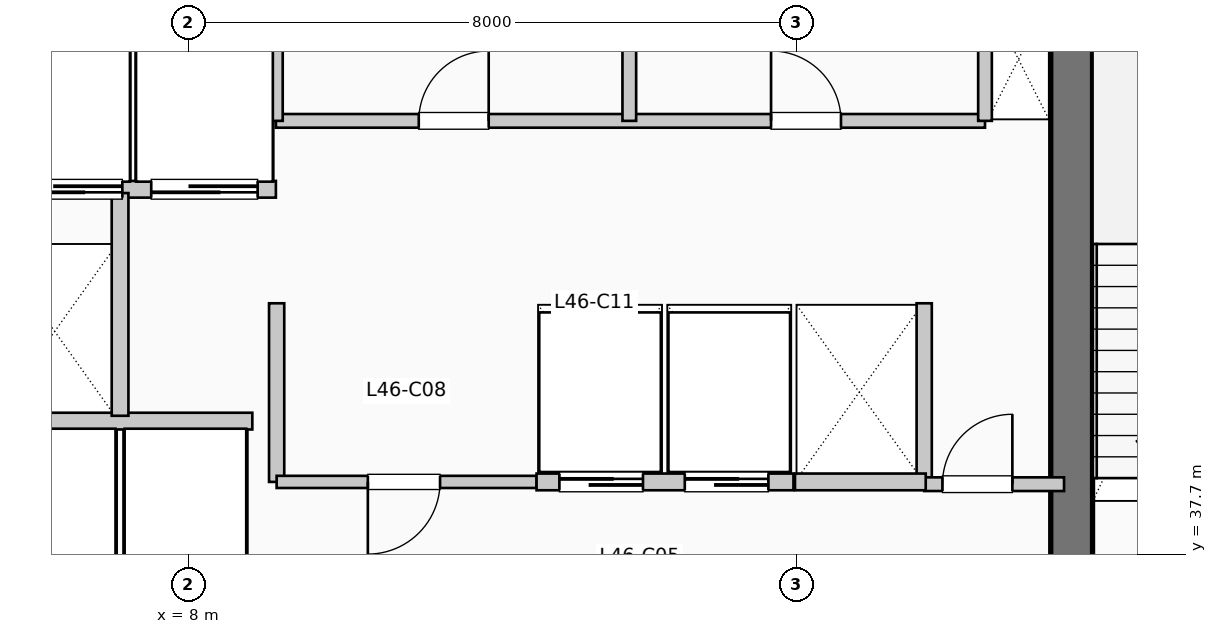
"""IFC4 building model, lengths in metres.
Left out: names, types, materials, properties, quantities, classifications, styles, units other than length and angle.
Written with IfcOpenShell. Run it as: python <this file> out.ifc"""

import sys

from ifc_helpers import new_model, si_unit, direction, frame, frame_2d, origin, place, context, subcontext, project, spatial, rectangle, extrude, element, fill, save


model = new_model("IFC4")
c1 = context("Model", 3, precision=1e-05, world=origin(), true_north=direction((0.0, 1.0)))
c2 = subcontext(c1, "Body", "Model", "MODEL_VIEW")
j1 = project(units=[si_unit("LENGTHUNIT", "METRE"), si_unit("PLANEANGLEUNIT", "RADIAN")], contexts=[c1])
p1 = place(None, origin())
s1 = spatial("IfcSite", under=j1, at=p1, CompositionType="ELEMENT")
p2 = place(p1, origin())
s2 = spatial("IfcBuilding", under=s1, at=p2, CompositionType="ELEMENT")
p3 = place(p2, frame((0.0, 0.0, 191.4)))
s3 = spatial("IfcBuildingStorey", under=s2, at=p3, CompositionType="ELEMENT", Elevation=191.4)
p4 = place(p3, frame((19.62, 37.15, 0.0), z_axis=(0.0, 0.0, 1.0), x_axis=(0.0, 1.0, 0.0)))
e1 = element("IfcWall", 1, at=p4, inside=s3, PredefinedType="SHEAR", context=c2, shape_type="SweptSolid", body=[
    extrude(rectangle(XDim=7.89, YDim=0.55, at=frame_2d((3.945, 0.0))), origin(), (0.0, 0.0, 1.0), 3.96),
])
p5 = place(p3, frame((5.38, 39.45, 0.0), z_axis=(0.0, 0.0, 1.0), x_axis=(1.0, 0.0, 0.0)))
e2 = element("IfcWall", 2, at=p5, inside=s3, PredefinedType="PARTITIONING", context=c2, shape_type="SweptSolid", body=[
    extrude(rectangle(XDim=3.46, YDim=0.22, at=frame_2d((1.73, 0.0))), origin(), (0.0, 0.0, 1.0), 3.71),
])
p6 = place(p3, frame((5.38, 42.5, 0.0), z_axis=(0.0, 0.0, 1.0), x_axis=(1.0, 0.0, 0.0)))
e3 = element("IfcWall", 3, at=p6, inside=s3, PredefinedType="PARTITIONING", context=c2, shape_type="SweptSolid", body=[
    extrude(rectangle(XDim=3.77, YDim=0.22, at=frame_2d((1.885, 0.0))), origin(), (0.0, 0.0, 1.0), 3.71),
])
p7 = place(p6, frame((1.75, 0.0, 0.0), z_axis=(0.0, 0.0, 1.0), x_axis=(-1.0, 0.0, 0.0)))
e4 = element("IfcOpeningElement", 4, at=p7, cuts=e3, PredefinedType="OPENING", context=c2, shape_type="SweptSolid", body=[
    extrude(rectangle(XDim=1.4, YDim=2.2, at=frame_2d((0.7, 1.1))), frame((0.0, 0.12, 0.0), z_axis=(0.0, -1.0, 0.0), x_axis=(1.0, 0.0, 0.0)), (0.0, 0.0, 1.0), 0.24),
])
p8 = place(p6, frame((3.53, 0.0, 0.0), z_axis=(0.0, 0.0, 1.0), x_axis=(-1.0, 0.0, 0.0)))
e5 = element("IfcOpeningElement", 5, at=p8, cuts=e3, PredefinedType="OPENING", context=c2, shape_type="SweptSolid", body=[
    extrude(rectangle(XDim=1.4, YDim=2.2, at=frame_2d((0.7, 1.1))), frame((0.0, 0.12, 0.0), z_axis=(0.0, -1.0, 0.0), x_axis=(1.0, 0.0, 0.0)), (0.0, 0.0, 1.0), 0.24),
])
p9 = place(p3, frame((7.1, 39.52, 0.0), z_axis=(0.0, 0.0, 1.0), x_axis=(0.0, 1.0, 0.0)))
e6 = element("IfcWall", 6, at=p9, inside=s3, PredefinedType="PARTITIONING", context=c2, shape_type="SweptSolid", body=[
    extrude(rectangle(XDim=2.93, YDim=0.22, at=frame_2d((1.465, 0.0))), origin(), (0.0, 0.0, 1.0), 3.71),
])
for number, where, z_axis, x_axis in (
    (7, (9.16, 38.65, 0.0), (0.0, 0.0, 1.0), (0.0, 1.0, 0.0)),
    (8, (17.68, 38.65, 0.0), (0.0, 0.0, 1.0), (0.0, 1.0, 0.0)),
):
    element("IfcWall", number, at=place(p3, frame(where, z_axis=z_axis, x_axis=x_axis)), inside=s3, PredefinedType="PARTITIONING", context=c2, shape_type="SweptSolid", body=[
        extrude(rectangle(XDim=2.35, YDim=0.2, at=frame_2d((1.175, 0.0))), origin(), (0.0, 0.0, 1.0), 3.71),
    ])
p10 = place(p3, frame((17.68, 38.62, 0.0), z_axis=(0.0, 0.0, 1.0), x_axis=(1.0, 0.0, 0.0)))
e9 = element("IfcWall", 9, at=p10, inside=s3, PredefinedType="PARTITIONING", context=c2, shape_type="SweptSolid", body=[
    extrude(rectangle(XDim=1.84, YDim=0.18, at=frame_2d((0.92, 0.0))), origin(), (0.0, 0.0, 1.0), 3.71),
])
p11 = place(p10, frame((0.24, 0.0, 0.0)))
e10 = element("IfcOpeningElement", 10, at=p11, cuts=e9, PredefinedType="OPENING", context=c2, shape_type="SweptSolid", body=[
    extrude(rectangle(XDim=0.92, YDim=2.1, at=frame_2d((0.46, 1.05))), frame((0.0, 0.1, 0.0), z_axis=(0.0, -1.0, 0.0), x_axis=(1.0, 0.0, 0.0)), (0.0, 0.0, 1.0), 0.2),
])
p12 = place(p3, frame((9.16, 38.65, 0.0), z_axis=(0.0, 0.0, 1.0), x_axis=(1.0, 0.0, 0.0)))
e11 = element("IfcWall", 11, at=p12, inside=s3, PredefinedType="PARTITIONING", context=c2, shape_type="SweptSolid", body=[
    extrude(rectangle(XDim=3.42, YDim=0.16, at=frame_2d((1.71, 0.0))), origin(), (0.0, 0.0, 1.0), 3.71),
])
p13 = place(p12, frame((2.15, 0.0, 0.0), z_axis=(0.0, 0.0, 1.0), x_axis=(-1.0, 0.0, 0.0)))
e12 = element("IfcOpeningElement", 12, at=p13, cuts=e11, PredefinedType="OPENING", context=c2, shape_type="SweptSolid", body=[
    extrude(rectangle(XDim=0.95, YDim=2.15, at=frame_2d((0.475, 1.075))), frame((0.0, 0.09, 0.0), z_axis=(0.0, -1.0, 0.0), x_axis=(1.0, 0.0, 0.0)), (0.0, 0.0, 1.0), 0.18),
])
p14 = place(p3, frame((12.58, 38.65, 0.0), z_axis=(0.0, 0.0, 1.0), x_axis=(1.0, 0.0, 0.0)))
e13 = element("IfcWall", 13, at=p14, inside=s3, PredefinedType="PARTITIONING", context=c2, shape_type="SweptSolid", body=[
    extrude(rectangle(XDim=3.38, YDim=0.22, at=frame_2d((1.69, 0.0))), origin(), (0.0, 0.0, 1.0), 3.71),
])
p15 = place(p14, frame((0.3, 0.0, 0.0)))
e14 = element("IfcOpeningElement", 14, at=p15, cuts=e13, PredefinedType="OPENING", context=c2, shape_type="SweptSolid", body=[
    extrude(rectangle(XDim=1.1, YDim=2.2, at=frame_2d((0.55, 1.1))), frame((0.0, 0.12, 0.0), z_axis=(0.0, -1.0, 0.0), x_axis=(1.0, 0.0, 0.0)), (0.0, 0.0, 1.0), 0.24),
])
p16 = place(p14, frame((1.95, 0.0, 0.0)))
e15 = element("IfcOpeningElement", 15, at=p16, cuts=e13, PredefinedType="OPENING", context=c2, shape_type="SweptSolid", body=[
    extrude(rectangle(XDim=1.1, YDim=2.2, at=frame_2d((0.55, 1.1))), frame((0.0, 0.12, 0.0), z_axis=(0.0, -1.0, 0.0), x_axis=(1.0, 0.0, 0.0)), (0.0, 0.0, 1.0), 0.24),
])
p17 = place(p3, frame((15.98, 38.65, 0.0), z_axis=(0.0, 0.0, 1.0), x_axis=(1.0, 0.0, 0.0)))
e16 = element("IfcWall", 16, at=p17, inside=s3, PredefinedType="PARTITIONING", context=c2, shape_type="SweptSolid", body=[
    extrude(rectangle(XDim=1.72, YDim=0.22, at=frame_2d((0.86, 0.0))), origin(), (0.0, 0.0, 1.0), 3.71),
])
p18 = place(p3, frame((9.15, 43.4, 0.0), z_axis=(0.0, 0.0, 1.0), x_axis=(1.0, 0.0, 0.0)))
e17 = element("IfcWall", 17, at=p18, inside=s3, PredefinedType="PLUMBINGWALL", context=c2, shape_type="SweptSolid", body=[
    extrude(rectangle(XDim=9.33, YDim=0.18, at=frame_2d((4.665, 0.0))), origin(), (0.0, 0.0, 1.0), 3.71),
])
p19 = place(p18, frame((1.88, 0.0, 0.0)))
e18 = element("IfcOpeningElement", 18, at=p19, cuts=e17, PredefinedType="OPENING", context=c2, shape_type="SweptSolid", body=[
    extrude(rectangle(XDim=0.92, YDim=2.1, at=frame_2d((0.46, 1.05))), frame((0.0, 0.1, 0.0), z_axis=(0.0, -1.0, 0.0), x_axis=(1.0, 0.0, 0.0)), (0.0, 0.0, 1.0), 0.2),
])
p20 = place(p18, frame((6.515, 0.0, 0.0)))
e19 = element("IfcOpeningElement", 19, at=p20, cuts=e17, PredefinedType="OPENING", context=c2, shape_type="SweptSolid", body=[
    extrude(rectangle(XDim=0.92, YDim=2.1, at=frame_2d((0.46, 1.05))), frame((0.0, 0.1, 0.0), z_axis=(0.0, -1.0, 0.0), x_axis=(1.0, 0.0, 0.0)), (0.0, 0.0, 1.0), 0.2),
])
for number, where, z_axis, x_axis in (
    (20, (9.15, 43.4, 0.0), (0.0, 0.0, 1.0), (0.0, 1.0, 0.0)),
    (21, (18.48, 43.4, 0.0), (0.0, 0.0, 1.0), (0.0, 1.0, 0.0)),
    (22, (13.8, 43.4, 0.0), (0.0, 0.0, 1.0), (0.0, 1.0, 0.0)),
):
    element("IfcWall", number, at=place(p3, frame(where, z_axis=z_axis, x_axis=x_axis)), inside=s3, PredefinedType="PLUMBINGWALL", context=c2, shape_type="SweptSolid", body=[
        extrude(rectangle(XDim=1.88, YDim=0.18, at=frame_2d((0.94, 0.0))), origin(), (0.0, 0.0, 1.0), 3.71),
    ])
p21 = place(p7, origin())
e23 = element("IfcDoor", 23, at=p21, inside=s3, OperationType="SLIDING_TO_LEFT", PredefinedType="DOOR", context=c2, shape_type="SweptSolid", body=[
    extrude(rectangle(XDim=1.4, YDim=2.2, at=frame_2d((0.7, 1.1))), frame((0.0, 0.025, 0.0), z_axis=(0.0, -1.0, 0.0), x_axis=(1.0, 0.0, 0.0)), (0.0, 0.0, 1.0), 0.05),
])
fill(e4, e23)
p22 = place(p8, origin())
e24 = element("IfcDoor", 24, at=p22, inside=s3, OperationType="SLIDING_TO_LEFT", PredefinedType="DOOR", context=c2, shape_type="SweptSolid", body=[
    extrude(rectangle(XDim=1.4, YDim=2.2, at=frame_2d((0.7, 1.1))), frame((0.0, 0.025, 0.0), z_axis=(0.0, -1.0, 0.0), x_axis=(1.0, 0.0, 0.0)), (0.0, 0.0, 1.0), 0.05),
])
fill(e5, e24)
p23 = place(p11, origin())
e25 = element("IfcDoor", 25, at=p23, inside=s3, OperationType="SINGLE_SWING_RIGHT", PredefinedType="DOOR", context=c2, shape_type="SweptSolid", body=[
    extrude(rectangle(XDim=0.92, YDim=2.1, at=frame_2d((0.46, 1.05))), frame((0.0, 0.025, 0.0), z_axis=(0.0, -1.0, 0.0), x_axis=(1.0, 0.0, 0.0)), (0.0, 0.0, 1.0), 0.05),
])
fill(e10, e25)
p24 = place(p13, origin())
e26 = element("IfcDoor", 26, at=p24, inside=s3, OperationType="SINGLE_SWING_LEFT", PredefinedType="DOOR", context=c2, shape_type="SweptSolid", body=[
    extrude(rectangle(XDim=0.95, YDim=2.15, at=frame_2d((0.475, 1.075))), frame((0.0, 0.025, 0.0), z_axis=(0.0, -1.0, 0.0), x_axis=(1.0, 0.0, 0.0)), (0.0, 0.0, 1.0), 0.05),
])
fill(e12, e26)
p25 = place(p15, origin())
e27 = element("IfcDoor", 27, at=p25, inside=s3, OperationType="SLIDING_TO_RIGHT", PredefinedType="DOOR", context=c2, shape_type="SweptSolid", body=[
    extrude(rectangle(XDim=1.1, YDim=2.2, at=frame_2d((0.55, 1.1))), frame((0.0, 0.025, 0.0), z_axis=(0.0, -1.0, 0.0), x_axis=(1.0, 0.0, 0.0)), (0.0, 0.0, 1.0), 0.05),
])
fill(e14, e27)
p26 = place(p16, origin())
e28 = element("IfcDoor", 28, at=p26, inside=s3, OperationType="SLIDING_TO_RIGHT", PredefinedType="DOOR", context=c2, shape_type="SweptSolid", body=[
    extrude(rectangle(XDim=1.1, YDim=2.2, at=frame_2d((0.55, 1.1))), frame((0.0, 0.025, 0.0), z_axis=(0.0, -1.0, 0.0), x_axis=(1.0, 0.0, 0.0)), (0.0, 0.0, 1.0), 0.05),
])
fill(e15, e28)
p27 = place(p19, origin())
e29 = element("IfcDoor", 29, at=p27, inside=s3, OperationType="SINGLE_SWING_RIGHT", PredefinedType="DOOR", context=c2, shape_type="SweptSolid", body=[
    extrude(rectangle(XDim=0.92, YDim=2.1, at=frame_2d((0.46, 1.05))), frame((0.0, 0.025, 0.0), z_axis=(0.0, -1.0, 0.0), x_axis=(1.0, 0.0, 0.0)), (0.0, 0.0, 1.0), 0.05),
])
fill(e18, e29)
p28 = place(p20, origin())
e30 = element("IfcDoor", 30, at=p28, inside=s3, OperationType="SINGLE_SWING_LEFT", PredefinedType="DOOR", context=c2, shape_type="SweptSolid", body=[
    extrude(rectangle(XDim=0.92, YDim=2.1, at=frame_2d((0.46, 1.05))), frame((0.0, 0.025, 0.0), z_axis=(0.0, -1.0, 0.0), x_axis=(1.0, 0.0, 0.0)), (0.0, 0.0, 1.0), 0.05),
])
fill(e19, e30)
save(model, sys.argv[1])
